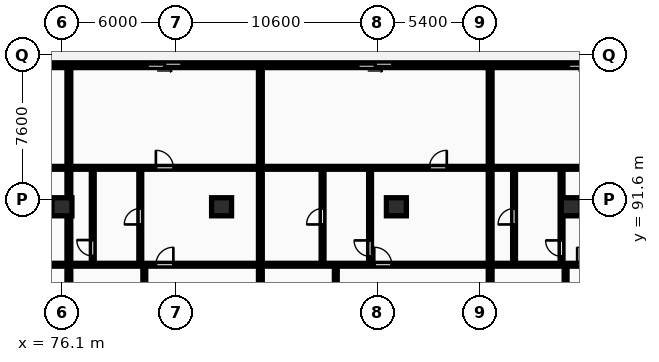
"""IFC4 building model, lengths in metres.
Left out: names, types, materials, properties, quantities, classifications, styles, units other than length and angle.
Written with IfcOpenShell. Run it as: python <this file> out.ifc"""

import sys

from ifc_helpers import new_model, si_unit, direction, frame, frame_2d, origin, origin_2d, place, context, subcontext, project, spatial, rectangle, extrude, element, fill, save


model = new_model("IFC4")
c1 = context("Model", 3, precision=1e-05, world=origin(), true_north=direction((0.0, 1.0)))
c2 = subcontext(c1, "Body", "Model", "MODEL_VIEW")
j1 = project(units=[si_unit("LENGTHUNIT", "METRE"), si_unit("PLANEANGLEUNIT", "RADIAN")], contexts=[c1])
p1 = place(None, origin())
s1 = spatial("IfcSite", under=j1, at=p1, CompositionType="ELEMENT")
p2 = place(p1, origin())
s2 = spatial("IfcBuilding", under=s1, at=p2, CompositionType="ELEMENT")
p3 = place(p2, frame((0.0, 0.0, 24.0)))
s3 = spatial("IfcBuildingStorey", under=s2, at=p3, CompositionType="ELEMENT", Elevation=24.0)
for number, where, z_axis, x_axis in (
    (1, (76.1, 91.2, 0.0), (0.0, 0.0, 1.0), (1.0, 0.0, 0.0)),
    (2, (84.5, 91.2, 0.0), (0.0, 0.0, 1.0), (1.0, 0.0, 0.0)),
    (3, (93.7, 91.2, 0.0), (0.0, 0.0, 1.0), (1.0, 0.0, 0.0)),
    (4, (102.9, 91.2, 0.0), (0.0, 0.0, 1.0), (1.0, 0.0, 0.0)),
):
    element("IfcColumn", number, at=place(p3, frame(where, z_axis=z_axis, x_axis=x_axis)), inside=s3, PredefinedType="COLUMN", context=c2, shape_type="SweptSolid", body=[
        extrude(rectangle(XDim=1.05, YDim=0.95, at=origin_2d()), origin(), (0.0, 0.0, 1.0), 3.25),
    ])
p4 = place(p3, frame((132.9, 98.65, 0.0), z_axis=(0.0, 0.0, 1.0), x_axis=(-1.0, 0.0, 0.0)))
e5 = element("IfcWall", 5, at=p4, inside=s3, PredefinedType="STANDARD", context=c2, shape_type="SweptSolid", body=[
    extrude(rectangle(XDim=77.6, YDim=0.25, at=frame_2d((38.8, 0.0))), origin(), (0.0, 0.0, 1.0), 2.97),
])
p5 = place(p4, frame((71.661, 0.0, 0.0)))
e6 = element("IfcOpeningElement", 6, at=p5, cuts=e5, PredefinedType="OPENING", context=c2, shape_type="SweptSolid", body=[
    extrude(rectangle(XDim=1.8, YDim=2.2, at=frame_2d((0.9, 1.1))), frame((0.0, 0.135, 0.0), z_axis=(0.0, -1.0, 0.0), x_axis=(1.0, 0.0, 0.0)), (0.0, 0.0, 1.0), 0.27),
])
p6 = place(p4, frame((61.079, 0.0, 0.0)))
e7 = element("IfcOpeningElement", 7, at=p6, cuts=e5, PredefinedType="OPENING", context=c2, shape_type="SweptSolid", body=[
    extrude(rectangle(XDim=1.8, YDim=2.2, at=frame_2d((0.9, 1.1))), frame((0.0, 0.135, 0.0), z_axis=(0.0, -1.0, 0.0), x_axis=(1.0, 0.0, 0.0)), (0.0, 0.0, 1.0), 0.27),
])
p7 = place(p4, frame((50.498, 0.0, 0.0)))
e8 = element("IfcOpeningElement", 8, at=p7, cuts=e5, PredefinedType="OPENING", context=c2, shape_type="SweptSolid", body=[
    extrude(rectangle(XDim=1.8, YDim=2.2, at=frame_2d((0.9, 1.1))), frame((0.0, 0.135, 0.0), z_axis=(0.0, -1.0, 0.0), x_axis=(1.0, 0.0, 0.0)), (0.0, 0.0, 1.0), 0.27),
])
p8 = place(p4, frame((39.412, 0.0, 0.0)))
e9 = element("IfcOpeningElement", 9, at=p8, cuts=e5, PredefinedType="OPENING", context=c2, shape_type="SweptSolid", body=[
    extrude(rectangle(XDim=1.8, YDim=2.2, at=frame_2d((0.9, 1.1))), frame((0.0, 0.135, 0.0), z_axis=(0.0, -1.0, 0.0), x_axis=(1.0, 0.0, 0.0)), (0.0, 0.0, 1.0), 0.27),
])
p9 = place(p4, frame((28.326, 0.0, 0.0)))
e10 = element("IfcOpeningElement", 10, at=p9, cuts=e5, PredefinedType="OPENING", context=c2, shape_type="SweptSolid", body=[
    extrude(rectangle(XDim=1.8, YDim=2.2, at=frame_2d((0.9, 1.1))), frame((0.0, 0.135, 0.0), z_axis=(0.0, -1.0, 0.0), x_axis=(1.0, 0.0, 0.0)), (0.0, 0.0, 1.0), 0.27),
])
p10 = place(p4, frame((17.744, 0.0, 0.0)))
e11 = element("IfcOpeningElement", 11, at=p10, cuts=e5, PredefinedType="OPENING", context=c2, shape_type="SweptSolid", body=[
    extrude(rectangle(XDim=1.8, YDim=2.2, at=frame_2d((0.9, 1.1))), frame((0.0, 0.135, 0.0), z_axis=(0.0, -1.0, 0.0), x_axis=(1.0, 0.0, 0.0)), (0.0, 0.0, 1.0), 0.27),
])
p11 = place(p4, frame((6.901, 0.0, 0.0)))
e12 = element("IfcOpeningElement", 12, at=p11, cuts=e5, PredefinedType="OPENING", context=c2, shape_type="SweptSolid", body=[
    extrude(rectangle(XDim=1.8, YDim=2.2, at=frame_2d((0.9, 1.1))), frame((0.0, 0.135, 0.0), z_axis=(0.0, -1.0, 0.0), x_axis=(1.0, 0.0, 0.0)), (0.0, 0.0, 1.0), 0.27),
])
p12 = place(p4, frame((0.6, 0.0, 0.85)))
e13 = element("IfcOpeningElement", 13, at=p12, cuts=e5, PredefinedType="OPENING", context=c2, shape_type="SweptSolid", body=[
    extrude(rectangle(XDim=1.8, YDim=1.8, at=frame_2d((0.9, 0.9))), frame((0.0, 0.135, 0.0), z_axis=(0.0, -1.0, 0.0), x_axis=(1.0, 0.0, 0.0)), (0.0, 0.0, 1.0), 0.27),
])
p13 = place(p3, frame((76.464, 69.43, 0.0), z_axis=(0.0, 0.0, 1.0), x_axis=(0.0, 1.0, 0.0)))
e14 = element("IfcWall", 14, at=p13, inside=s3, PredefinedType="PARTITIONING", context=c2, shape_type="SweptSolid", body=[
    extrude(rectangle(XDim=29.07, YDim=0.2, at=frame_2d((14.535, 0.0))), origin(), (0.0, 0.0, 1.0), 2.22),
])
p14 = place(p3, frame((65.458, 88.15, 0.0), z_axis=(0.0, 0.0, 1.0), x_axis=(1.0, 0.0, 0.0)))
e15 = element("IfcWall", 15, at=p14, inside=s3, PredefinedType="PARTITIONING", context=c2, shape_type="SweptSolid", body=[
    extrude(rectangle(XDim=10.926, YDim=0.15, at=frame_2d((5.463, 0.0))), origin(), (0.0, 0.0, 1.0), 2.97),
])
p15 = place(p14, frame((5.003, 0.0, 0.0)))
e16 = element("IfcOpeningElement", 16, at=p15, cuts=e15, PredefinedType="OPENING", context=c2, shape_type="SweptSolid", body=[
    extrude(rectangle(XDim=0.92, YDim=2.08, at=frame_2d((0.46, 1.04))), frame((0.0, 0.085, 0.0), z_axis=(0.0, -1.0, 0.0), x_axis=(1.0, 0.0, 0.0)), (0.0, 0.0, 1.0), 0.17),
])
p16 = place(p3, frame((65.458, 93.25, 0.0), z_axis=(0.0, 0.0, 1.0), x_axis=(1.0, 0.0, 0.0)))
e17 = element("IfcWall", 17, at=p16, inside=s3, PredefinedType="PARTITIONING", context=c2, shape_type="SweptSolid", body=[
    extrude(rectangle(XDim=10.926, YDim=0.15, at=frame_2d((5.463, 0.0))), origin(), (0.0, 0.0, 1.0), 2.97),
])
p17 = place(p16, frame((5.003, 0.0, 0.0)))
e18 = element("IfcOpeningElement", 18, at=p17, cuts=e17, PredefinedType="OPENING", context=c2, shape_type="SweptSolid", body=[
    extrude(rectangle(XDim=0.92, YDim=2.08, at=frame_2d((0.46, 1.04))), frame((0.0, 0.085, 0.0), z_axis=(0.0, -1.0, 0.0), x_axis=(1.0, 0.0, 0.0)), (0.0, 0.0, 1.0), 0.17),
])
p18 = place(p3, frame((86.542, 69.43, 0.0), z_axis=(0.0, 0.0, 1.0), x_axis=(0.0, 1.0, 0.0)))
e19 = element("IfcWall", 19, at=p18, inside=s3, PredefinedType="PARTITIONING", context=c2, shape_type="SweptSolid", body=[
    extrude(rectangle(XDim=29.07, YDim=0.2, at=frame_2d((14.535, 0.0))), origin(), (0.0, 0.0, 1.0), 2.97),
])
p19 = place(p3, frame((80.434, 69.41, 0.0), z_axis=(0.0, 0.0, 1.0), x_axis=(0.0, 1.0, 0.0)))
e20 = element("IfcWall", 20, at=p19, inside=s3, PredefinedType="PARTITIONING", context=c2, shape_type="SweptSolid", body=[
    extrude(rectangle(XDim=18.7, YDim=0.15, at=frame_2d((9.35, 0.0))), origin(), (0.0, 0.0, 1.0), 2.97),
])
p20 = place(p19, frame((8.04, 0.0, 0.0)))
e21 = element("IfcOpeningElement", 21, at=p20, cuts=e20, PredefinedType="OPENING", context=c2, shape_type="SweptSolid", body=[
    extrude(rectangle(XDim=0.88, YDim=2.06, at=frame_2d((0.44, 1.03))), frame((0.0, 0.085, 0.0), z_axis=(0.0, -1.0, 0.0), x_axis=(1.0, 0.0, 0.0)), (0.0, 0.0, 1.0), 0.17),
])
p21 = place(p3, frame((77.721, 88.19, 0.0), z_axis=(0.0, 0.0, 1.0), x_axis=(0.0, 1.0, 0.0)))
e22 = element("IfcWall", 22, at=p21, inside=s3, PredefinedType="PARTITIONING", context=c2, shape_type="SweptSolid", body=[
    extrude(rectangle(XDim=5.0, YDim=0.15, at=frame_2d((2.5, 0.0))), origin(), (0.0, 0.0, 1.0), 2.97),
])
p22 = place(p21, frame((0.419, 0.0, 0.0)))
e23 = element("IfcOpeningElement", 23, at=p22, cuts=e22, PredefinedType="OPENING", context=c2, shape_type="SweptSolid", body=[
    extrude(rectangle(XDim=0.84, YDim=2.04, at=frame_2d((0.42, 1.02))), frame((0.0, 0.085, 0.0), z_axis=(0.0, -1.0, 0.0), x_axis=(1.0, 0.0, 0.0)), (0.0, 0.0, 1.0), 0.17),
])
p23 = place(p3, frame((80.221, 88.19, 0.0), z_axis=(0.0, 0.0, 1.0), x_axis=(0.0, 1.0, 0.0)))
e24 = element("IfcWall", 24, at=p23, inside=s3, PredefinedType="PARTITIONING", context=c2, shape_type="SweptSolid", body=[
    extrude(rectangle(XDim=5.0, YDim=0.15, at=frame_2d((2.5, 0.0))), origin(), (0.0, 0.0, 1.0), 2.97),
])
p24 = place(p23, frame((2.08, 0.0, 0.0)))
e25 = element("IfcOpeningElement", 25, at=p24, cuts=e24, PredefinedType="OPENING", context=c2, shape_type="SweptSolid", body=[
    extrude(rectangle(XDim=0.84, YDim=2.04, at=frame_2d((0.42, 1.02))), frame((0.0, 0.085, 0.0), z_axis=(0.0, -1.0, 0.0), x_axis=(1.0, 0.0, 0.0)), (0.0, 0.0, 1.0), 0.17),
])
p25 = place(p3, frame((76.544, 88.15, 0.0), z_axis=(0.0, 0.0, 1.0), x_axis=(1.0, 0.0, 0.0)))
e26 = element("IfcWall", 26, at=p25, inside=s3, PredefinedType="PARTITIONING", context=c2, shape_type="SweptSolid", body=[
    extrude(rectangle(XDim=9.918, YDim=0.15, at=frame_2d((4.959, 0.0))), origin(), (0.0, 0.0, 1.0), 2.97),
])
p26 = place(p25, frame((4.499, 0.0, 0.0)))
e27 = element("IfcOpeningElement", 27, at=p26, cuts=e26, PredefinedType="OPENING", context=c2, shape_type="SweptSolid", body=[
    extrude(rectangle(XDim=0.92, YDim=2.08, at=frame_2d((0.46, 1.04))), frame((0.0, 0.085, 0.0), z_axis=(0.0, -1.0, 0.0), x_axis=(1.0, 0.0, 0.0)), (0.0, 0.0, 1.0), 0.17),
])
p27 = place(p3, frame((76.544, 93.25, 0.0), z_axis=(0.0, 0.0, 1.0), x_axis=(1.0, 0.0, 0.0)))
e28 = element("IfcWall", 28, at=p27, inside=s3, PredefinedType="PARTITIONING", context=c2, shape_type="SweptSolid", body=[
    extrude(rectangle(XDim=9.918, YDim=0.15, at=frame_2d((4.959, 0.0))), origin(), (0.0, 0.0, 1.0), 2.97),
])
p28 = place(p27, frame((4.499, 0.0, 0.0)))
e29 = element("IfcOpeningElement", 29, at=p28, cuts=e28, PredefinedType="OPENING", context=c2, shape_type="SweptSolid", body=[
    extrude(rectangle(XDim=0.92, YDim=2.08, at=frame_2d((0.46, 1.04))), frame((0.0, 0.085, 0.0), z_axis=(0.0, -1.0, 0.0), x_axis=(1.0, 0.0, 0.0)), (0.0, 0.0, 1.0), 0.17),
])
p29 = place(p3, frame((98.635, 69.43, 0.0), z_axis=(0.0, 0.0, 1.0), x_axis=(0.0, 1.0, 0.0)))
e30 = element("IfcWall", 30, at=p29, inside=s3, PredefinedType="PARTITIONING", context=c2, shape_type="SweptSolid", body=[
    extrude(rectangle(XDim=29.07, YDim=0.2, at=frame_2d((14.535, 0.0))), origin(), (0.0, 0.0, 1.0), 2.97),
])
p30 = place(p3, frame((90.511, 69.41, 0.0), z_axis=(0.0, 0.0, 1.0), x_axis=(0.0, 1.0, 0.0)))
e31 = element("IfcWall", 31, at=p30, inside=s3, PredefinedType="PARTITIONING", context=c2, shape_type="SweptSolid", body=[
    extrude(rectangle(XDim=18.7, YDim=0.15, at=frame_2d((9.35, 0.0))), origin(), (0.0, 0.0, 1.0), 2.97),
])
p31 = place(p30, frame((8.22, 0.0, 0.0)))
e32 = element("IfcOpeningElement", 32, at=p31, cuts=e31, PredefinedType="OPENING", context=c2, shape_type="SweptSolid", body=[
    extrude(rectangle(XDim=0.88, YDim=2.06, at=frame_2d((0.44, 1.03))), frame((0.0, 0.085, 0.0), z_axis=(0.0, -1.0, 0.0), x_axis=(1.0, 0.0, 0.0)), (0.0, 0.0, 1.0), 0.17),
])
p32 = place(p3, frame((89.815, 88.19, 0.0), z_axis=(0.0, 0.0, 1.0), x_axis=(0.0, 1.0, 0.0)))
e33 = element("IfcWall", 33, at=p32, inside=s3, PredefinedType="PARTITIONING", context=c2, shape_type="SweptSolid", body=[
    extrude(rectangle(XDim=5.0, YDim=0.15, at=frame_2d((2.5, 0.0))), origin(), (0.0, 0.0, 1.0), 2.97),
])
p33 = place(p32, frame((2.08, 0.0, 0.0)))
e34 = element("IfcOpeningElement", 34, at=p33, cuts=e33, PredefinedType="OPENING", context=c2, shape_type="SweptSolid", body=[
    extrude(rectangle(XDim=0.84, YDim=2.04, at=frame_2d((0.42, 1.02))), frame((0.0, 0.085, 0.0), z_axis=(0.0, -1.0, 0.0), x_axis=(1.0, 0.0, 0.0)), (0.0, 0.0, 1.0), 0.17),
])
p34 = place(p3, frame((92.315, 88.19, 0.0), z_axis=(0.0, 0.0, 1.0), x_axis=(0.0, 1.0, 0.0)))
e35 = element("IfcWall", 35, at=p34, inside=s3, PredefinedType="PARTITIONING", context=c2, shape_type="SweptSolid", body=[
    extrude(rectangle(XDim=5.0, YDim=0.15, at=frame_2d((2.5, 0.0))), origin(), (0.0, 0.0, 1.0), 2.97),
])
p35 = place(p34, frame((0.4, 0.0, 0.0)))
e36 = element("IfcOpeningElement", 36, at=p35, cuts=e35, PredefinedType="OPENING", context=c2, shape_type="SweptSolid", body=[
    extrude(rectangle(XDim=0.84, YDim=2.04, at=frame_2d((0.42, 1.02))), frame((0.0, 0.085, 0.0), z_axis=(0.0, -1.0, 0.0), x_axis=(1.0, 0.0, 0.0)), (0.0, 0.0, 1.0), 0.17),
])
p36 = place(p3, frame((86.622, 88.15, 0.0), z_axis=(0.0, 0.0, 1.0), x_axis=(1.0, 0.0, 0.0)))
e37 = element("IfcWall", 37, at=p36, inside=s3, PredefinedType="PARTITIONING", context=c2, shape_type="SweptSolid", body=[
    extrude(rectangle(XDim=11.933, YDim=0.15, at=frame_2d((5.967, 0.0))), origin(), (0.0, 0.0, 1.0), 2.97),
])
p37 = place(p36, frame((5.914, 0.0, 0.0)))
e38 = element("IfcOpeningElement", 38, at=p37, cuts=e37, PredefinedType="OPENING", context=c2, shape_type="SweptSolid", body=[
    extrude(rectangle(XDim=0.92, YDim=2.08, at=frame_2d((0.46, 1.04))), frame((0.0, 0.085, 0.0), z_axis=(0.0, -1.0, 0.0), x_axis=(1.0, 0.0, 0.0)), (0.0, 0.0, 1.0), 0.17),
])
p38 = place(p3, frame((86.622, 93.25, 0.0), z_axis=(0.0, 0.0, 1.0), x_axis=(1.0, 0.0, 0.0)))
e39 = element("IfcWall", 39, at=p38, inside=s3, PredefinedType="PARTITIONING", context=c2, shape_type="SweptSolid", body=[
    extrude(rectangle(XDim=11.933, YDim=0.15, at=frame_2d((5.967, 0.0))), origin(), (0.0, 0.0, 1.0), 2.97),
])
p39 = place(p38, frame((8.812, 0.0, 0.0)))
e40 = element("IfcOpeningElement", 40, at=p39, cuts=e39, PredefinedType="OPENING", context=c2, shape_type="SweptSolid", body=[
    extrude(rectangle(XDim=0.92, YDim=2.08, at=frame_2d((0.46, 1.04))), frame((0.0, 0.085, 0.0), z_axis=(0.0, -1.0, 0.0), x_axis=(1.0, 0.0, 0.0)), (0.0, 0.0, 1.0), 0.17),
])
p40 = place(p3, frame((102.605, 69.41, 0.0), z_axis=(0.0, 0.0, 1.0), x_axis=(0.0, 1.0, 0.0)))
e41 = element("IfcWall", 41, at=p40, inside=s3, PredefinedType="PARTITIONING", context=c2, shape_type="SweptSolid", body=[
    extrude(rectangle(XDim=18.7, YDim=0.15, at=frame_2d((9.35, 0.0))), origin(), (0.0, 0.0, 1.0), 2.22),
])
p41 = place(p40, frame((7.595, 0.0, 0.0)))
e42 = element("IfcOpeningElement", 42, at=p41, cuts=e41, PredefinedType="OPENING", context=c2, shape_type="SweptSolid", body=[
    extrude(rectangle(XDim=0.88, YDim=2.06, at=frame_2d((0.44, 1.03))), frame((0.0, 0.085, 0.0), z_axis=(0.0, -1.0, 0.0), x_axis=(1.0, 0.0, 0.0)), (0.0, 0.0, 1.0), 0.17),
])
p42 = place(p3, frame((99.893, 88.19, 0.0), z_axis=(0.0, 0.0, 1.0), x_axis=(0.0, 1.0, 0.0)))
e43 = element("IfcWall", 43, at=p42, inside=s3, PredefinedType="PARTITIONING", context=c2, shape_type="SweptSolid", body=[
    extrude(rectangle(XDim=5.0, YDim=0.15, at=frame_2d((2.5, 0.0))), origin(), (0.0, 0.0, 1.0), 2.97),
])
p43 = place(p42, frame((2.08, 0.0, 0.0)))
e44 = element("IfcOpeningElement", 44, at=p43, cuts=e43, PredefinedType="OPENING", context=c2, shape_type="SweptSolid", body=[
    extrude(rectangle(XDim=0.84, YDim=2.04, at=frame_2d((0.42, 1.02))), frame((0.0, 0.085, 0.0), z_axis=(0.0, -1.0, 0.0), x_axis=(1.0, 0.0, 0.0)), (0.0, 0.0, 1.0), 0.17),
])
p44 = place(p3, frame((102.393, 88.19, 0.0), z_axis=(0.0, 0.0, 1.0), x_axis=(0.0, 1.0, 0.0)))
e45 = element("IfcWall", 45, at=p44, inside=s3, PredefinedType="PARTITIONING", context=c2, shape_type="SweptSolid", body=[
    extrude(rectangle(XDim=5.0, YDim=0.15, at=frame_2d((2.5, 0.0))), origin(), (0.0, 0.0, 1.0), 2.97),
])
p45 = place(p44, frame((0.4, 0.0, 0.0)))
e46 = element("IfcOpeningElement", 46, at=p45, cuts=e45, PredefinedType="OPENING", context=c2, shape_type="SweptSolid", body=[
    extrude(rectangle(XDim=0.84, YDim=2.04, at=frame_2d((0.42, 1.02))), frame((0.0, 0.085, 0.0), z_axis=(0.0, -1.0, 0.0), x_axis=(1.0, 0.0, 0.0)), (0.0, 0.0, 1.0), 0.17),
])
p46 = place(p3, frame((98.715, 88.15, 0.0), z_axis=(0.0, 0.0, 1.0), x_axis=(1.0, 0.0, 0.0)))
e47 = element("IfcWall", 47, at=p46, inside=s3, PredefinedType="PARTITIONING", context=c2, shape_type="SweptSolid", body=[
    extrude(rectangle(XDim=9.918, YDim=0.15, at=frame_2d((4.959, 0.0))), origin(), (0.0, 0.0, 1.0), 2.97),
])
p47 = place(p46, frame((4.499, 0.0, 0.0)))
e48 = element("IfcOpeningElement", 48, at=p47, cuts=e47, PredefinedType="OPENING", context=c2, shape_type="SweptSolid", body=[
    extrude(rectangle(XDim=0.92, YDim=2.08, at=frame_2d((0.46, 1.04))), frame((0.0, 0.085, 0.0), z_axis=(0.0, -1.0, 0.0), x_axis=(1.0, 0.0, 0.0)), (0.0, 0.0, 1.0), 0.17),
])
p48 = place(p3, frame((98.715, 93.25, 0.0), z_axis=(0.0, 0.0, 1.0), x_axis=(1.0, 0.0, 0.0)))
e49 = element("IfcWall", 49, at=p48, inside=s3, PredefinedType="PARTITIONING", context=c2, shape_type="SweptSolid", body=[
    extrude(rectangle(XDim=9.918, YDim=0.15, at=frame_2d((4.959, 0.0))), origin(), (0.0, 0.0, 1.0), 2.97),
])
p49 = place(p48, frame((5.936, 0.0, 0.0)))
e50 = element("IfcOpeningElement", 50, at=p49, cuts=e49, PredefinedType="OPENING", context=c2, shape_type="SweptSolid", body=[
    extrude(rectangle(XDim=0.92, YDim=2.08, at=frame_2d((0.46, 1.04))), frame((0.0, 0.085, 0.0), z_axis=(0.0, -1.0, 0.0), x_axis=(1.0, 0.0, 0.0)), (0.0, 0.0, 1.0), 0.17),
])
p50 = place(p7, origin())
e51 = element("IfcDoor", 51, at=p50, inside=s3, OperationType="SLIDING_TO_LEFT", PredefinedType="DOOR", context=c2, shape_type="SweptSolid", body=[
    extrude(rectangle(XDim=1.8, YDim=2.2, at=frame_2d((0.9, 1.1))), frame((0.0, 0.025, 0.0), z_axis=(0.0, -1.0, 0.0), x_axis=(1.0, 0.0, 0.0)), (0.0, 0.0, 1.0), 0.05),
])
fill(e8, e51)
p51 = place(p8, origin())
e52 = element("IfcDoor", 52, at=p51, inside=s3, OperationType="SLIDING_TO_LEFT", PredefinedType="DOOR", context=c2, shape_type="SweptSolid", body=[
    extrude(rectangle(XDim=1.8, YDim=2.2, at=frame_2d((0.9, 1.1))), frame((0.0, 0.025, 0.0), z_axis=(0.0, -1.0, 0.0), x_axis=(1.0, 0.0, 0.0)), (0.0, 0.0, 1.0), 0.05),
])
fill(e9, e52)
p52 = place(p9, origin())
e53 = element("IfcDoor", 53, at=p52, inside=s3, OperationType="SLIDING_TO_LEFT", PredefinedType="DOOR", context=c2, shape_type="SweptSolid", body=[
    extrude(rectangle(XDim=1.8, YDim=2.2, at=frame_2d((0.9, 1.1))), frame((0.0, 0.025, 0.0), z_axis=(0.0, -1.0, 0.0), x_axis=(1.0, 0.0, 0.0)), (0.0, 0.0, 1.0), 0.05),
])
fill(e10, e53)
p53 = place(p22, origin())
e54 = element("IfcDoor", 54, at=p53, inside=s3, OperationType="SINGLE_SWING_RIGHT", PredefinedType="DOOR", context=c2, shape_type="SweptSolid", body=[
    extrude(rectangle(XDim=0.84, YDim=2.04, at=frame_2d((0.42, 1.02))), frame((0.0, 0.025, 0.0), z_axis=(0.0, -1.0, 0.0), x_axis=(1.0, 0.0, 0.0)), (0.0, 0.0, 1.0), 0.05),
])
fill(e23, e54)
p54 = place(p24, origin())
e55 = element("IfcDoor", 55, at=p54, inside=s3, OperationType="SINGLE_SWING_LEFT", PredefinedType="DOOR", context=c2, shape_type="SweptSolid", body=[
    extrude(rectangle(XDim=0.84, YDim=2.04, at=frame_2d((0.42, 1.02))), frame((0.0, 0.025, 0.0), z_axis=(0.0, -1.0, 0.0), x_axis=(1.0, 0.0, 0.0)), (0.0, 0.0, 1.0), 0.05),
])
fill(e25, e55)
p55 = place(p26, origin())
e56 = element("IfcDoor", 56, at=p55, inside=s3, OperationType="SINGLE_SWING_RIGHT", PredefinedType="DOOR", context=c2, shape_type="SweptSolid", body=[
    extrude(rectangle(XDim=0.92, YDim=2.08, at=frame_2d((0.46, 1.04))), frame((0.0, 0.025, 0.0), z_axis=(0.0, -1.0, 0.0), x_axis=(1.0, 0.0, 0.0)), (0.0, 0.0, 1.0), 0.05),
])
fill(e27, e56)
p56 = place(p28, origin())
e57 = element("IfcDoor", 57, at=p56, inside=s3, OperationType="SINGLE_SWING_LEFT", PredefinedType="DOOR", context=c2, shape_type="SweptSolid", body=[
    extrude(rectangle(XDim=0.92, YDim=2.08, at=frame_2d((0.46, 1.04))), frame((0.0, 0.025, 0.0), z_axis=(0.0, -1.0, 0.0), x_axis=(1.0, 0.0, 0.0)), (0.0, 0.0, 1.0), 0.05),
])
fill(e29, e57)
p57 = place(p33, origin())
e58 = element("IfcDoor", 58, at=p57, inside=s3, OperationType="SINGLE_SWING_LEFT", PredefinedType="DOOR", context=c2, shape_type="SweptSolid", body=[
    extrude(rectangle(XDim=0.84, YDim=2.04, at=frame_2d((0.42, 1.02))), frame((0.0, 0.025, 0.0), z_axis=(0.0, -1.0, 0.0), x_axis=(1.0, 0.0, 0.0)), (0.0, 0.0, 1.0), 0.05),
])
fill(e34, e58)
p58 = place(p35, origin())
e59 = element("IfcDoor", 59, at=p58, inside=s3, OperationType="SINGLE_SWING_RIGHT", PredefinedType="DOOR", context=c2, shape_type="SweptSolid", body=[
    extrude(rectangle(XDim=0.84, YDim=2.04, at=frame_2d((0.42, 1.02))), frame((0.0, 0.025, 0.0), z_axis=(0.0, -1.0, 0.0), x_axis=(1.0, 0.0, 0.0)), (0.0, 0.0, 1.0), 0.05),
])
fill(e36, e59)
p59 = place(p37, origin())
e60 = element("IfcDoor", 60, at=p59, inside=s3, OperationType="SINGLE_SWING_LEFT", PredefinedType="DOOR", context=c2, shape_type="SweptSolid", body=[
    extrude(rectangle(XDim=0.92, YDim=2.08, at=frame_2d((0.46, 1.04))), frame((0.0, 0.025, 0.0), z_axis=(0.0, -1.0, 0.0), x_axis=(1.0, 0.0, 0.0)), (0.0, 0.0, 1.0), 0.05),
])
fill(e38, e60)
p60 = place(p39, origin())
e61 = element("IfcDoor", 61, at=p60, inside=s3, OperationType="SINGLE_SWING_RIGHT", PredefinedType="DOOR", context=c2, shape_type="SweptSolid", body=[
    extrude(rectangle(XDim=0.92, YDim=2.08, at=frame_2d((0.46, 1.04))), frame((0.0, 0.025, 0.0), z_axis=(0.0, -1.0, 0.0), x_axis=(1.0, 0.0, 0.0)), (0.0, 0.0, 1.0), 0.05),
])
fill(e40, e61)
p61 = place(p43, origin())
e62 = element("IfcDoor", 62, at=p61, inside=s3, OperationType="SINGLE_SWING_LEFT", PredefinedType="DOOR", context=c2, shape_type="SweptSolid", body=[
    extrude(rectangle(XDim=0.84, YDim=2.04, at=frame_2d((0.42, 1.02))), frame((0.0, 0.025, 0.0), z_axis=(0.0, -1.0, 0.0), x_axis=(1.0, 0.0, 0.0)), (0.0, 0.0, 1.0), 0.05),
])
fill(e44, e62)
p62 = place(p45, origin())
e63 = element("IfcDoor", 63, at=p62, inside=s3, OperationType="SINGLE_SWING_RIGHT", PredefinedType="DOOR", context=c2, shape_type="SweptSolid", body=[
    extrude(rectangle(XDim=0.84, YDim=2.04, at=frame_2d((0.42, 1.02))), frame((0.0, 0.025, 0.0), z_axis=(0.0, -1.0, 0.0), x_axis=(1.0, 0.0, 0.0)), (0.0, 0.0, 1.0), 0.05),
])
fill(e46, e63)
p63 = place(p47, origin())
e64 = element("IfcDoor", 64, at=p63, inside=s3, OperationType="SINGLE_SWING_LEFT", PredefinedType="DOOR", context=c2, shape_type="SweptSolid", body=[
    extrude(rectangle(XDim=0.92, YDim=2.08, at=frame_2d((0.46, 1.04))), frame((0.0, 0.025, 0.0), z_axis=(0.0, -1.0, 0.0), x_axis=(1.0, 0.0, 0.0)), (0.0, 0.0, 1.0), 0.05),
])
fill(e48, e64)
save(model, sys.argv[1])
